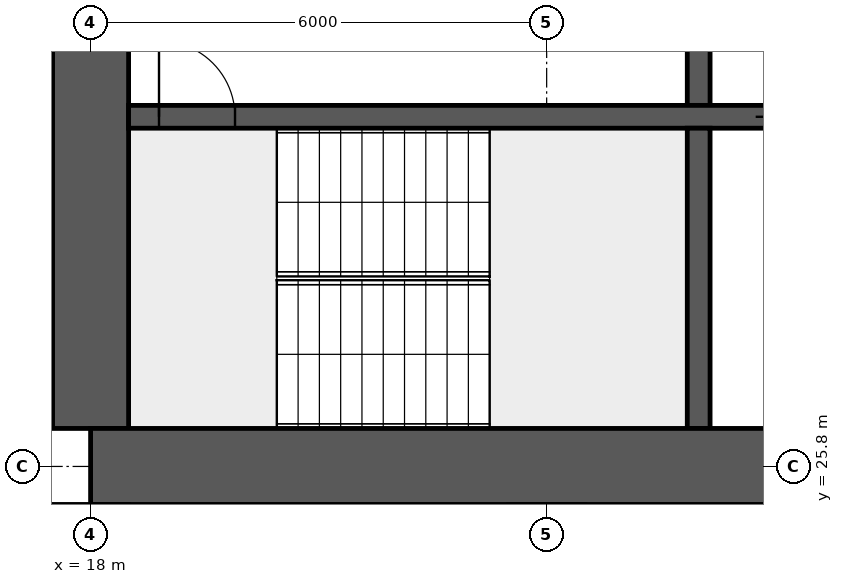
"""IFC4 building model, lengths in metres.
Left out: names, types, materials, properties, quantities, classifications, styles, units other than length and angle.
Written with IfcOpenShell. Run it as: python <this file> out.ifc"""

import sys

from ifc_helpers import new_model, si_unit, direction, frame, frame_2d, origin, place, context, subcontext, project, spatial, rectangle, extrude, element, fill, save


model = new_model("IFC4")
c1 = context("Model", 3, precision=1e-05, world=origin(), true_north=direction((0.0, 1.0)))
c2 = subcontext(c1, "Body", "Model", "MODEL_VIEW")
j1 = project(units=[si_unit("LENGTHUNIT", "METRE"), si_unit("PLANEANGLEUNIT", "RADIAN")], contexts=[c1])
p1 = place(None, origin())
s1 = spatial("IfcSite", under=j1, at=p1, CompositionType="ELEMENT")
p2 = place(p1, origin())
s2 = spatial("IfcBuilding", under=s1, at=p2, CompositionType="ELEMENT")
p3 = place(p2, frame((0.0, 0.0, 50.2)))
s3 = spatial("IfcBuildingStorey", under=s2, at=p3, CompositionType="ELEMENT", Elevation=50.2)
p4 = place(p3, frame((18.0, 25.8, 0.0), z_axis=(0.0, 0.0, 1.0), x_axis=(1.0, 0.0, 0.0)))
e1 = element("IfcWall", 1, at=p4, inside=s3, PredefinedType="SHEAR", context=c2, shape_type="SweptSolid", body=[
    extrude(rectangle(XDim=48.0, YDim=1.0, at=frame_2d((24.0, 0.0))), origin(), (0.0, 0.0, 1.0), 3.75),
])
p5 = place(p3, frame((18.0, 26.3, 0.0), z_axis=(0.0, 0.0, 1.0), x_axis=(0.0, 1.0, 0.0)))
e2 = element("IfcWall", 2, at=p5, inside=s3, PredefinedType="SHEAR", context=c2, shape_type="SweptSolid", body=[
    extrude(rectangle(XDim=11.4, YDim=1.0, at=frame_2d((5.7, 0.0))), origin(), (0.0, 0.0, 1.0), 3.75),
])
p6 = place(p5, frame((5.0, 0.0, 0.0)))
e3 = element("IfcOpeningElement", 3, at=p6, cuts=e2, PredefinedType="OPENING", context=c2, shape_type="SweptSolid", body=[
    extrude(rectangle(XDim=1.2, YDim=2.1, at=frame_2d((0.6, 1.05))), frame((0.0, 0.51, 0.0), z_axis=(0.0, -1.0, 0.0), x_axis=(1.0, 0.0, 0.0)), (0.0, 0.0, 1.0), 1.02),
])
p7 = place(p3, frame((18.5, 30.4, 0.0), z_axis=(0.0, 0.0, 1.0), x_axis=(1.0, 0.0, 0.0)))
e4 = element("IfcWall", 4, at=p7, inside=s3, PredefinedType="SHEAR", context=c2, shape_type="SweptSolid", body=[
    extrude(rectangle(XDim=47.0, YDim=0.3, at=frame_2d((23.5, 0.0))), origin(), (0.0, 0.0, 1.0), 3.75),
])
p8 = place(p7, frame((0.4, 0.0, 0.0)))
e5 = element("IfcOpeningElement", 5, at=p8, cuts=e4, PredefinedType="OPENING", context=c2, shape_type="SweptSolid", body=[
    extrude(rectangle(XDim=1.0, YDim=2.1, at=frame_2d((0.5, 1.05))), frame((0.0, 0.16, 0.0), z_axis=(0.0, -1.0, 0.0), x_axis=(1.0, 0.0, 0.0)), (0.0, 0.0, 1.0), 0.32),
])
p9 = place(p7, frame((45.6, 0.0, 0.0)))
e6 = element("IfcOpeningElement", 6, at=p9, cuts=e4, PredefinedType="OPENING", context=c2, shape_type="SweptSolid", body=[
    extrude(rectangle(XDim=1.0, YDim=2.1, at=frame_2d((0.5, 1.05))), frame((0.0, 0.16, 0.0), z_axis=(0.0, -1.0, 0.0), x_axis=(1.0, 0.0, 0.0)), (0.0, 0.0, 1.0), 0.32),
])
p10 = place(p7, frame((8.25, 0.0, 0.0)))
e7 = element("IfcOpeningElement", 7, at=p10, cuts=e4, PredefinedType="OPENING", context=c2, shape_type="SweptSolid", body=[
    extrude(rectangle(XDim=1.1, YDim=2.1, at=frame_2d((0.55, 1.05))), frame((0.0, 0.16, 0.0), z_axis=(0.0, -1.0, 0.0), x_axis=(1.0, 0.0, 0.0)), (0.0, 0.0, 1.0), 0.32),
])
p11 = place(p7, frame((10.85, 0.0, 0.0)))
e8 = element("IfcOpeningElement", 8, at=p11, cuts=e4, PredefinedType="OPENING", context=c2, shape_type="SweptSolid", body=[
    extrude(rectangle(XDim=1.1, YDim=2.1, at=frame_2d((0.55, 1.05))), frame((0.0, 0.16, 0.0), z_axis=(0.0, -1.0, 0.0), x_axis=(1.0, 0.0, 0.0)), (0.0, 0.0, 1.0), 0.32),
])
p12 = place(p7, frame((13.45, 0.0, 0.0)))
e9 = element("IfcOpeningElement", 9, at=p12, cuts=e4, PredefinedType="OPENING", context=c2, shape_type="SweptSolid", body=[
    extrude(rectangle(XDim=1.1, YDim=2.1, at=frame_2d((0.55, 1.05))), frame((0.0, 0.16, 0.0), z_axis=(0.0, -1.0, 0.0), x_axis=(1.0, 0.0, 0.0)), (0.0, 0.0, 1.0), 0.32),
])
p13 = place(p7, frame((16.05, 0.0, 0.0)))
e10 = element("IfcOpeningElement", 10, at=p13, cuts=e4, PredefinedType="OPENING", context=c2, shape_type="SweptSolid", body=[
    extrude(rectangle(XDim=1.1, YDim=2.1, at=frame_2d((0.55, 1.05))), frame((0.0, 0.16, 0.0), z_axis=(0.0, -1.0, 0.0), x_axis=(1.0, 0.0, 0.0)), (0.0, 0.0, 1.0), 0.32),
])
p14 = place(p7, frame((30.117, 0.0, 0.0)))
e11 = element("IfcOpeningElement", 11, at=p14, cuts=e4, PredefinedType="OPENING", context=c2, shape_type="SweptSolid", body=[
    extrude(rectangle(XDim=1.1, YDim=2.1, at=frame_2d((0.55, 1.05))), frame((0.0, 0.16, 0.0), z_axis=(0.0, -1.0, 0.0), x_axis=(1.0, 0.0, 0.0)), (0.0, 0.0, 1.0), 0.32),
])
p15 = place(p7, frame((33.65, 0.0, 0.0)))
e12 = element("IfcOpeningElement", 12, at=p15, cuts=e4, PredefinedType="OPENING", context=c2, shape_type="SweptSolid", body=[
    extrude(rectangle(XDim=1.1, YDim=2.1, at=frame_2d((0.55, 1.05))), frame((0.0, 0.16, 0.0), z_axis=(0.0, -1.0, 0.0), x_axis=(1.0, 0.0, 0.0)), (0.0, 0.0, 1.0), 0.32),
])
p16 = place(p7, frame((37.183, 0.0, 0.0)))
e13 = element("IfcOpeningElement", 13, at=p16, cuts=e4, PredefinedType="OPENING", context=c2, shape_type="SweptSolid", body=[
    extrude(rectangle(XDim=1.1, YDim=2.1, at=frame_2d((0.55, 1.05))), frame((0.0, 0.16, 0.0), z_axis=(0.0, -1.0, 0.0), x_axis=(1.0, 0.0, 0.0)), (0.0, 0.0, 1.0), 0.32),
])
p17 = place(p3, frame((26.0, 26.3, 0.0), z_axis=(0.0, 0.0, 1.0), x_axis=(0.0, 1.0, 0.0)))
e14 = element("IfcWall", 14, at=p17, inside=s3, PredefinedType="SHEAR", context=c2, shape_type="SweptSolid", body=[
    extrude(rectangle(XDim=3.95, YDim=0.3, at=frame_2d((1.975, 0.0))), origin(), (0.0, 0.0, 1.0), 3.75),
])
p18 = place(p3, frame((26.0, 30.55, 0.0), z_axis=(0.0, 0.0, 1.0), x_axis=(0.0, 1.0, 0.0)))
e15 = element("IfcWall", 15, at=p18, inside=s3, PredefinedType="SHEAR", context=c2, shape_type="SweptSolid", body=[
    extrude(rectangle(XDim=3.9, YDim=0.3, at=frame_2d((1.95, 0.0))), origin(), (0.0, 0.0, 1.0), 3.75),
])
p19 = place(p18, frame((1.4, 0.0, 0.0)))
e16 = element("IfcOpeningElement", 16, at=p19, cuts=e15, PredefinedType="OPENING", context=c2, shape_type="SweptSolid", body=[
    extrude(rectangle(XDim=1.2, YDim=2.1, at=frame_2d((0.6, 1.05))), frame((0.0, 0.16, 0.0), z_axis=(0.0, -1.0, 0.0), x_axis=(1.0, 0.0, 0.0)), (0.0, 0.0, 1.0), 0.32),
])
p20 = place(p3, frame((26.815, 14.9, 0.0), z_axis=(0.0, 0.0, 1.0), x_axis=(0.0, 1.0, 0.0)))
e17 = element("IfcWall", 17, at=p20, inside=s3, PredefinedType="PARTITIONING", context=c2, shape_type="SweptSolid", body=[
    extrude(rectangle(XDim=10.4, YDim=0.15, at=frame_2d((5.2, 0.0))), origin(), (0.0, 0.0, 1.0), 3.3),
])
p21 = place(p8, origin())
e18 = element("IfcDoor", 18, at=p21, inside=s3, OperationType="SINGLE_SWING_LEFT", PredefinedType="DOOR", context=c2, shape_type="SweptSolid", body=[
    extrude(rectangle(XDim=1.0, YDim=2.1, at=frame_2d((0.5, 1.05))), frame((0.0, 0.025, 0.0), z_axis=(0.0, -1.0, 0.0), x_axis=(1.0, 0.0, 0.0)), (0.0, 0.0, 1.0), 0.05),
])
fill(e5, e18)
p22 = place(p10, origin())
e19 = element("IfcDoor", 19, at=p22, inside=s3, OperationType="DOUBLE_DOOR_SLIDING", PredefinedType="DOOR", context=c2, shape_type="SweptSolid", body=[
    extrude(rectangle(XDim=1.1, YDim=2.1, at=frame_2d((0.55, 1.05))), frame((0.0, 0.025, 0.0), z_axis=(0.0, -1.0, 0.0), x_axis=(1.0, 0.0, 0.0)), (0.0, 0.0, 1.0), 0.05),
])
fill(e7, e19)
save(model, sys.argv[1])
